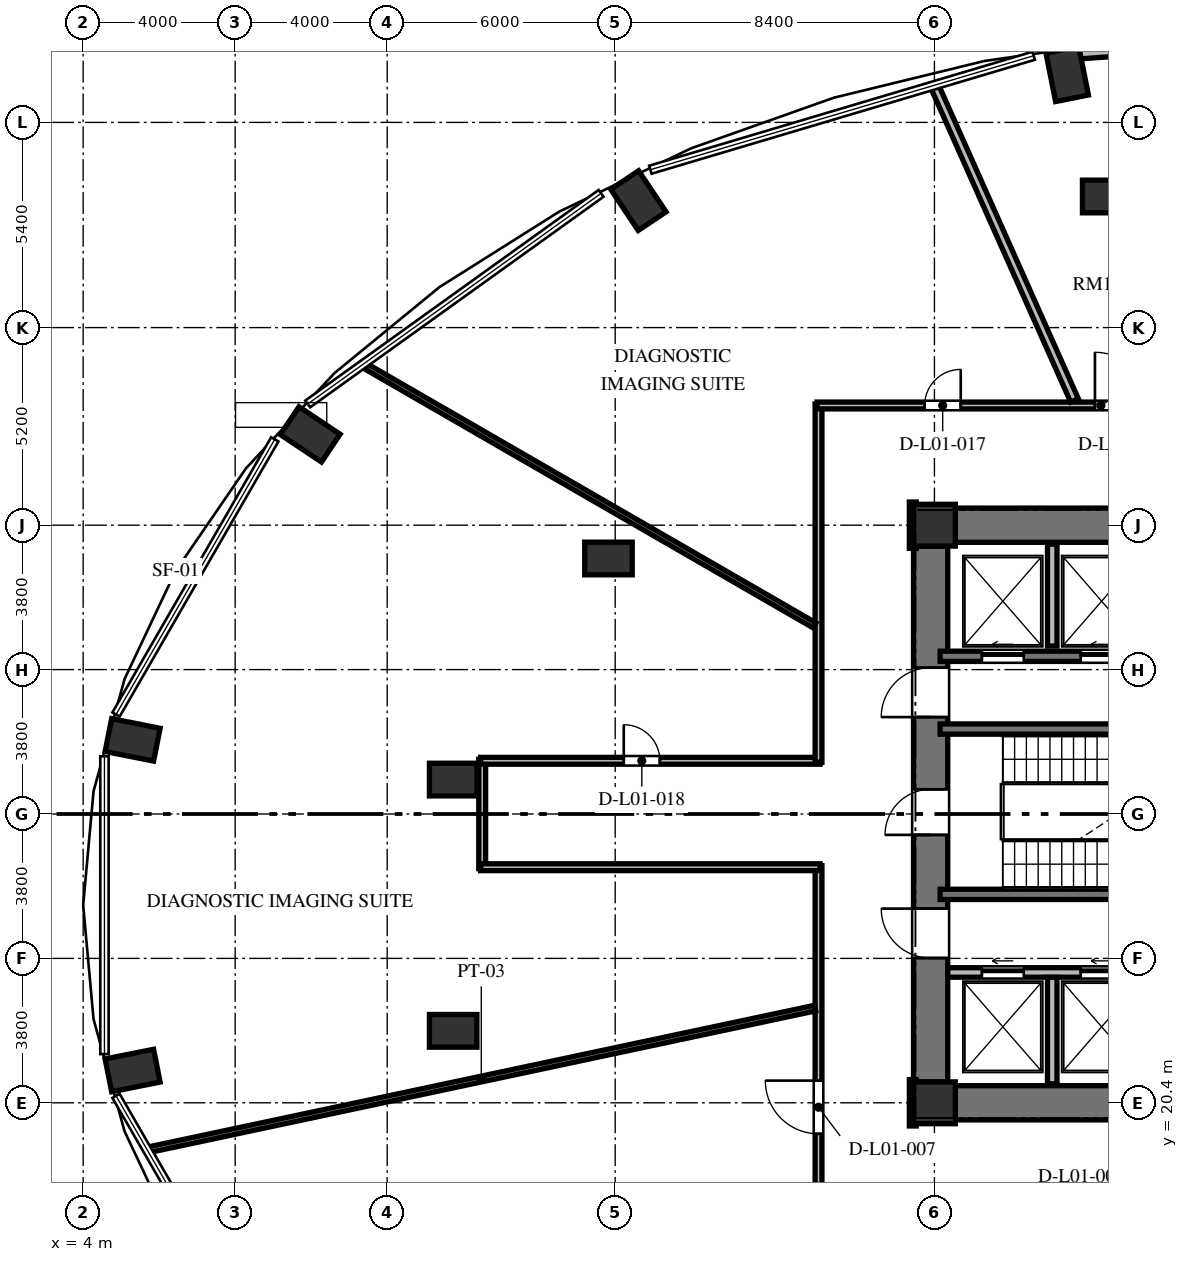
"""IFC4 building model, lengths in metres.
Left out: names, types, materials, properties, quantities, classifications, styles, units other than length and angle.
Written with IfcOpenShell. Run it as: python <this file> out.ifc"""

import sys

from ifc_helpers import new_model, si_unit, direction, frame, frame_2d, origin, origin_2d, place, context, subcontext, project, spatial, rectangle, extrude, element, fill, save


model = new_model("IFC4")
c1 = context("Model", 3, precision=1e-05, world=origin(), true_north=direction((0.0, 1.0)))
c2 = subcontext(c1, "Body", "Model", "MODEL_VIEW")
j1 = project(units=[si_unit("LENGTHUNIT", "METRE"), si_unit("PLANEANGLEUNIT", "RADIAN")], contexts=[c1])
p1 = place(None, origin())
s1 = spatial("IfcSite", under=j1, at=p1, CompositionType="ELEMENT")
p2 = place(p1, origin())
s2 = spatial("IfcBuilding", under=s1, at=p2, CompositionType="ELEMENT")
p3 = place(p2, frame((0.0, 0.0, 6.0)))
s3 = spatial("IfcBuildingStorey", under=s2, at=p3, CompositionType="ELEMENT", Elevation=6.0)
for number, where, z_axis, x_axis in (
    (1, (29.894, 47.471, 0.0), (0.0, 0.0, 1.0), (-0.195, 0.981, 0.0)),
    (2, (18.611, 44.142, 0.0), (0.0, 0.0, 1.0), (-0.556, 0.831, 0.0)),
    (3, (9.975, 37.989, 0.0), (0.0, 0.0, 1.0), (-0.831, 0.556, 0.0)),
    (4, (5.302, 29.95, 0.0), (0.0, 0.0, 1.0), (-0.981, 0.195, 0.0)),
    (5, (5.302, 21.25, 0.0), (0.0, 0.0, 1.0), (-0.981, -0.195, 0.0)),
):
    element("IfcColumn", number, at=place(p3, frame(where, z_axis=z_axis, x_axis=x_axis)), inside=s3, PredefinedType="COLUMN", context=c2, shape_type="SweptSolid", body=[
        extrude(rectangle(XDim=1.3, YDim=0.88, at=origin_2d()), origin(), (0.0, 0.0, 1.0), 4.8),
    ])
for number, where, z_axis, x_axis in (
    (6, (26.4, 20.4, 0.0), (0.0, 0.0, 1.0), (1.0, 0.0, 0.0)),
    (7, (26.4, 35.6, 0.0), (0.0, 0.0, 1.0), (1.0, 0.0, 0.0)),
):
    element("IfcColumn", number, at=place(p3, frame(where, z_axis=z_axis, x_axis=x_axis)), inside=s3, PredefinedType="COLUMN", context=c2, shape_type="SweptSolid", body=[
        extrude(rectangle(XDim=1.1, YDim=1.1, at=origin_2d()), origin(), (0.0, 0.0, 1.0), 4.8),
    ])
for number, where, z_axis, x_axis in (
    (8, (30.92, 44.25, 0.0), (0.0, 0.0, 1.0), (1.0, 0.0, 0.0)),
    (9, (17.823, 34.724, 0.0), (0.0, 0.0, 1.0), (1.0, 0.0, 0.0)),
    (10, (13.737, 28.906, 0.0), (0.0, 0.0, 1.0), (1.0, 0.0, 0.0)),
    (11, (13.737, 22.294, 0.0), (0.0, 0.0, 1.0), (1.0, 0.0, 0.0)),
):
    element("IfcColumn", number, at=place(p3, frame(where, z_axis=z_axis, x_axis=x_axis)), inside=s3, PredefinedType="COLUMN", context=c2, shape_type="SweptSolid", body=[
        extrude(rectangle(XDim=1.25, YDim=0.86, at=origin_2d()), origin(), (0.0, 0.0, 1.0), 4.8),
    ])
p4 = place(p3, frame((26.3, 20.95, 0.0), z_axis=(0.0, 0.0, 1.0), x_axis=(0.0, 1.0, 0.0)))
e12 = element("IfcWall", 12, at=p4, inside=s3, PredefinedType="SHEAR", context=c2, shape_type="SweptSolid", body=[
    extrude(rectangle(XDim=14.1, YDim=0.9, at=frame_2d((7.05, 0.0))), origin(), (0.0, 0.0, 1.0), 4.8),
])
p5 = place(p4, frame((6.5, 0.0, 0.0)))
e13 = element("IfcOpeningElement", 13, at=p5, cuts=e12, PredefinedType="OPENING", context=c2, shape_type="SweptSolid", body=[
    extrude(rectangle(XDim=1.2, YDim=2.15, at=frame_2d((0.6, 1.075))), frame((0.0, 0.46, 0.0), z_axis=(0.0, -1.0, 0.0), x_axis=(1.0, 0.0, 0.0)), (0.0, 0.0, 1.0), 0.92),
])
p6 = place(p4, frame((9.6, 0.0, 0.0)))
e14 = element("IfcOpeningElement", 14, at=p6, cuts=e12, PredefinedType="OPENING", context=c2, shape_type="SweptSolid", body=[
    extrude(rectangle(XDim=1.3, YDim=2.2, at=frame_2d((0.65, 1.1))), frame((0.0, 0.46, 0.0), z_axis=(0.0, -1.0, 0.0), x_axis=(1.0, 0.0, 0.0)), (0.0, 0.0, 1.0), 0.92),
])
p7 = place(p4, frame((3.26, 0.0, 0.0)))
e15 = element("IfcOpeningElement", 15, at=p7, cuts=e12, PredefinedType="OPENING", context=c2, shape_type="SweptSolid", body=[
    extrude(rectangle(XDim=1.3, YDim=2.2, at=frame_2d((0.65, 1.1))), frame((0.0, 0.46, 0.0), z_axis=(0.0, -1.0, 0.0), x_axis=(1.0, 0.0, 0.0)), (0.0, 0.0, 1.0), 0.92),
])
for number, where, z_axis, x_axis in (
    (16, (26.95, 20.4, 0.0), (0.0, 0.0, 1.0), (1.0, 0.0, 0.0)),
    (17, (26.95, 35.6, 0.0), (0.0, 0.0, 1.0), (1.0, 0.0, 0.0)),
):
    element("IfcWall", number, at=place(p3, frame(where, z_axis=z_axis, x_axis=x_axis)), inside=s3, PredefinedType="SHEAR", context=c2, shape_type="SweptSolid", body=[
        extrude(rectangle(XDim=5.3, YDim=0.9, at=frame_2d((2.65, 0.0))), origin(), (0.0, 0.0, 1.0), 4.8),
    ])
p8 = place(p3, frame((36.179, 48.453, 0.0), z_axis=(0.0, 0.0, 1.0), x_axis=(-0.997513108184, -0.070481196075, 0.0)))
e18 = element("IfcWall", 18, at=p8, inside=s3, PredefinedType="SOLIDWALL", context=c2, shape_type="SweptSolid", body=[
    extrude(rectangle(XDim=6.457, YDim=0.32, at=frame_2d((3.229, 0.0))), origin(), (0.0, 0.0, 1.0), 4.52),
])
p9 = place(p8, frame((1.548, 0.0, 0.85)))
e19 = element("IfcOpeningElement", 19, at=p9, cuts=e18, PredefinedType="OPENING", context=c2, shape_type="SweptSolid", body=[
    extrude(rectangle(XDim=1.8, YDim=2.4, at=frame_2d((0.9, 1.2))), frame((0.0, 0.17, 0.0), z_axis=(0.0, -1.0, 0.0), x_axis=(1.0, 0.0, 0.0)), (0.0, 0.0, 1.0), 0.34),
])
for number, where, z_axis, x_axis in (
    (20, (26.55, 30.235, 0.0), (0.0, 0.0, 1.0), (1.0, 0.0, 0.0)),
    (21, (26.55, 25.885, 0.0), (0.0, 0.0, 1.0), (1.0, 0.0, 0.0)),
):
    element("IfcWall", number, at=place(p3, frame(where, z_axis=z_axis, x_axis=x_axis)), inside=s3, PredefinedType="SHEAR", context=c2, shape_type="SweptSolid", body=[
        extrude(rectangle(XDim=7.985, YDim=0.27, at=frame_2d((3.992, 0.0))), origin(), (0.0, 0.0, 1.0), 4.8),
    ])
p10 = place(p3, frame((26.55, 32.15, 0.0), z_axis=(0.0, 0.0, 1.0), x_axis=(1.0, 0.0, 0.0)))
e22 = element("IfcWall", 22, at=p10, inside=s3, PredefinedType="SHEAR", context=c2, shape_type="SweptSolid", body=[
    extrude(rectangle(XDim=16.4, YDim=0.27, at=frame_2d((8.2, 0.0))), origin(), (0.0, 0.0, 1.0), 4.8),
])
p11 = place(p10, frame((1.1, 0.0, 0.0)))
e23 = element("IfcOpeningElement", 23, at=p11, cuts=e22, PredefinedType="OPENING", context=c2, shape_type="SweptSolid", body=[
    extrude(rectangle(XDim=1.1, YDim=2.2, at=frame_2d((0.55, 1.1))), frame((0.0, 0.145, 0.0), z_axis=(0.0, -1.0, 0.0), x_axis=(1.0, 0.0, 0.0)), (0.0, 0.0, 1.0), 0.29),
])
p12 = place(p10, frame((3.7, 0.0, 0.0)))
e24 = element("IfcOpeningElement", 24, at=p12, cuts=e22, PredefinedType="OPENING", context=c2, shape_type="SweptSolid", body=[
    extrude(rectangle(XDim=1.1, YDim=2.2, at=frame_2d((0.55, 1.1))), frame((0.0, 0.145, 0.0), z_axis=(0.0, -1.0, 0.0), x_axis=(1.0, 0.0, 0.0)), (0.0, 0.0, 1.0), 0.29),
])
p13 = place(p10, frame((6.5, 0.0, 0.0)))
e25 = element("IfcOpeningElement", 25, at=p13, cuts=e22, PredefinedType="OPENING", context=c2, shape_type="SweptSolid", body=[
    extrude(rectangle(XDim=1.1, YDim=2.2, at=frame_2d((0.55, 1.1))), frame((0.0, 0.145, 0.0), z_axis=(0.0, -1.0, 0.0), x_axis=(1.0, 0.0, 0.0)), (0.0, 0.0, 1.0), 0.29),
])
p14 = place(p10, frame((9.1, 0.0, 0.0)))
e26 = element("IfcOpeningElement", 26, at=p14, cuts=e22, PredefinedType="OPENING", context=c2, shape_type="SweptSolid", body=[
    extrude(rectangle(XDim=1.1, YDim=2.2, at=frame_2d((0.55, 1.1))), frame((0.0, 0.145, 0.0), z_axis=(0.0, -1.0, 0.0), x_axis=(1.0, 0.0, 0.0)), (0.0, 0.0, 1.0), 0.29),
])
p15 = place(p10, frame((11.9, 0.0, 0.0)))
e27 = element("IfcOpeningElement", 27, at=p15, cuts=e22, PredefinedType="OPENING", context=c2, shape_type="SweptSolid", body=[
    extrude(rectangle(XDim=1.1, YDim=2.2, at=frame_2d((0.55, 1.1))), frame((0.0, 0.145, 0.0), z_axis=(0.0, -1.0, 0.0), x_axis=(1.0, 0.0, 0.0)), (0.0, 0.0, 1.0), 0.29),
])
p16 = place(p10, frame((14.5, 0.0, 0.0)))
e28 = element("IfcOpeningElement", 28, at=p16, cuts=e22, PredefinedType="OPENING", context=c2, shape_type="SweptSolid", body=[
    extrude(rectangle(XDim=1.1, YDim=2.2, at=frame_2d((0.55, 1.1))), frame((0.0, 0.145, 0.0), z_axis=(0.0, -1.0, 0.0), x_axis=(1.0, 0.0, 0.0)), (0.0, 0.0, 1.0), 0.29),
])
p17 = place(p3, frame((26.75, 23.83, 0.0), z_axis=(0.0, 0.0, 1.0), x_axis=(1.0, 0.0, 0.0)))
e29 = element("IfcWall", 29, at=p17, inside=s3, PredefinedType="SOLIDWALL", context=c2, shape_type="SweptSolid", body=[
    extrude(rectangle(XDim=16.2, YDim=0.25, at=frame_2d((8.1, 0.0))), origin(), (0.0, 0.0, 1.0), 4.52),
])
p18 = place(p17, frame((0.9, 0.0, 0.0)))
e30 = element("IfcOpeningElement", 30, at=p18, cuts=e29, PredefinedType="OPENING", context=c2, shape_type="SweptSolid", body=[
    extrude(rectangle(XDim=1.1, YDim=2.2, at=frame_2d((0.55, 1.1))), frame((0.0, 0.135, 0.0), z_axis=(0.0, -1.0, 0.0), x_axis=(1.0, 0.0, 0.0)), (0.0, 0.0, 1.0), 0.27),
])
p19 = place(p17, frame((3.5, 0.0, 0.0)))
e31 = element("IfcOpeningElement", 31, at=p19, cuts=e29, PredefinedType="OPENING", context=c2, shape_type="SweptSolid", body=[
    extrude(rectangle(XDim=1.1, YDim=2.2, at=frame_2d((0.55, 1.1))), frame((0.0, 0.135, 0.0), z_axis=(0.0, -1.0, 0.0), x_axis=(1.0, 0.0, 0.0)), (0.0, 0.0, 1.0), 0.27),
])
p20 = place(p17, frame((6.3, 0.0, 0.0)))
e32 = element("IfcOpeningElement", 32, at=p20, cuts=e29, PredefinedType="OPENING", context=c2, shape_type="SweptSolid", body=[
    extrude(rectangle(XDim=1.1, YDim=2.2, at=frame_2d((0.55, 1.1))), frame((0.0, 0.135, 0.0), z_axis=(0.0, -1.0, 0.0), x_axis=(1.0, 0.0, 0.0)), (0.0, 0.0, 1.0), 0.27),
])
p21 = place(p17, frame((8.9, 0.0, 0.0)))
e33 = element("IfcOpeningElement", 33, at=p21, cuts=e29, PredefinedType="OPENING", context=c2, shape_type="SweptSolid", body=[
    extrude(rectangle(XDim=1.1, YDim=2.2, at=frame_2d((0.55, 1.1))), frame((0.0, 0.135, 0.0), z_axis=(0.0, -1.0, 0.0), x_axis=(1.0, 0.0, 0.0)), (0.0, 0.0, 1.0), 0.27),
])
p22 = place(p17, frame((11.7, 0.0, 0.0)))
e34 = element("IfcOpeningElement", 34, at=p22, cuts=e29, PredefinedType="OPENING", context=c2, shape_type="SweptSolid", body=[
    extrude(rectangle(XDim=1.1, YDim=2.2, at=frame_2d((0.55, 1.1))), frame((0.0, 0.135, 0.0), z_axis=(0.0, -1.0, 0.0), x_axis=(1.0, 0.0, 0.0)), (0.0, 0.0, 1.0), 0.27),
])
p23 = place(p17, frame((14.15, 0.0, 0.0)))
e35 = element("IfcOpeningElement", 35, at=p23, cuts=e29, PredefinedType="OPENING", context=c2, shape_type="SweptSolid", body=[
    extrude(rectangle(XDim=1.4, YDim=2.3, at=frame_2d((0.7, 1.15))), frame((0.0, 0.135, 0.0), z_axis=(0.0, -1.0, 0.0), x_axis=(1.0, 0.0, 0.0)), (0.0, 0.0, 1.0), 0.27),
])
p24 = place(p3, frame((29.5, 32.42, 0.0), z_axis=(0.0, 0.0, 1.0), x_axis=(0.0, 1.0, 0.0)))
e36 = element("IfcWall", 36, at=p24, inside=s3, PredefinedType="SOLIDWALL", context=c2, shape_type="SweptSolid", body=[
    extrude(rectangle(XDim=2.68, YDim=0.25, at=frame_2d((1.34, 0.0))), origin(), (0.0, 0.0, 1.0), 4.52),
])
p25 = place(p3, frame((29.5, 20.9, 0.0), z_axis=(0.0, 0.0, 1.0), x_axis=(0.0, 1.0, 0.0)))
e37 = element("IfcWall", 37, at=p25, inside=s3, PredefinedType="SOLIDWALL", context=c2, shape_type="SweptSolid", body=[
    extrude(rectangle(XDim=2.8, YDim=0.25, at=frame_2d((1.4, 0.0))), origin(), (0.0, 0.0, 1.0), 4.52),
])
p26 = place(p3, frame((14.5, 26.56, 0.0), z_axis=(0.0, 0.0, 1.0), x_axis=(0.0, 1.0, 0.0)))
e38 = element("IfcWall", 38, at=p26, inside=s3, PredefinedType="PARTITIONING", context=c2, shape_type="SweptSolid", body=[
    extrude(rectangle(XDim=2.88, YDim=0.18, at=frame_2d((1.44, 0.0))), origin(), (0.0, 0.0, 1.0), 4.52),
])
p27 = place(p3, frame((14.46, 29.4, 0.0), z_axis=(0.0, 0.0, 1.0), x_axis=(1.0, 0.0, 0.0)))
e39 = element("IfcWall", 39, at=p27, inside=s3, PredefinedType="PARTITIONING", context=c2, shape_type="SweptSolid", body=[
    extrude(rectangle(XDim=8.93, YDim=0.18, at=frame_2d((4.465, 0.0))), origin(), (0.0, 0.0, 1.0), 4.52),
])
p28 = place(p27, frame((3.765, 0.0, 0.0)))
e40 = element("IfcOpeningElement", 40, at=p28, cuts=e39, PredefinedType="OPENING", context=c2, shape_type="SweptSolid", body=[
    extrude(rectangle(XDim=0.95, YDim=2.1, at=frame_2d((0.475, 1.05))), frame((0.0, 0.1, 0.0), z_axis=(0.0, -1.0, 0.0), x_axis=(1.0, 0.0, 0.0)), (0.0, 0.0, 1.0), 0.2),
])
p29 = place(p3, frame((23.35, 29.36, 0.0), z_axis=(0.0, 0.0, 1.0), x_axis=(0.0, 1.0, 0.0)))
e41 = element("IfcWall", 41, at=p29, inside=s3, PredefinedType="PARTITIONING", context=c2, shape_type="SweptSolid", body=[
    extrude(rectangle(XDim=9.43, YDim=0.18, at=frame_2d((4.715, 0.0))), origin(), (0.0, 0.0, 1.0), 4.52),
])
p30 = place(p3, frame((23.31, 38.75, 0.0), z_axis=(0.0, 0.0, 1.0), x_axis=(1.0, 0.0, 0.0)))
e42 = element("IfcWall", 42, at=p30, inside=s3, PredefinedType="PARTITIONING", context=c2, shape_type="SweptSolid", body=[
    extrude(rectangle(XDim=29.88, YDim=0.18, at=frame_2d((14.94, 0.0))), origin(), (0.0, 0.0, 1.0), 4.52),
])
p31 = place(p30, frame((25.211, 0.0, 0.0)))
e43 = element("IfcOpeningElement", 43, at=p31, cuts=e42, PredefinedType="OPENING", context=c2, shape_type="SweptSolid", body=[
    extrude(rectangle(XDim=1.4, YDim=2.2, at=frame_2d((0.7, 1.1))), frame((0.0, 0.1, 0.0), z_axis=(0.0, -1.0, 0.0), x_axis=(1.0, 0.0, 0.0)), (0.0, 0.0, 1.0), 0.2),
])
p32 = place(p30, frame((18.158, 0.0, 0.0)))
e44 = element("IfcOpeningElement", 44, at=p32, cuts=e42, PredefinedType="OPENING", context=c2, shape_type="SweptSolid", body=[
    extrude(rectangle(XDim=1.05, YDim=2.15, at=frame_2d((0.525, 1.075))), frame((0.0, 0.1, 0.0), z_axis=(0.0, -1.0, 0.0), x_axis=(1.0, 0.0, 0.0)), (0.0, 0.0, 1.0), 0.2),
])
p33 = place(p30, frame((11.785, 0.0, 0.0)))
e45 = element("IfcOpeningElement", 45, at=p33, cuts=e42, PredefinedType="OPENING", context=c2, shape_type="SweptSolid", body=[
    extrude(rectangle(XDim=1.05, YDim=2.15, at=frame_2d((0.525, 1.075))), frame((0.0, 0.1, 0.0), z_axis=(0.0, -1.0, 0.0), x_axis=(1.0, 0.0, 0.0)), (0.0, 0.0, 1.0), 0.2),
])
p34 = place(p30, frame((7.314, 0.0, 0.0)))
e46 = element("IfcOpeningElement", 46, at=p34, cuts=e42, PredefinedType="OPENING", context=c2, shape_type="SweptSolid", body=[
    extrude(rectangle(XDim=1.4, YDim=2.2, at=frame_2d((0.7, 1.1))), frame((0.0, 0.1, 0.0), z_axis=(0.0, -1.0, 0.0), x_axis=(1.0, 0.0, 0.0)), (0.0, 0.0, 1.0), 0.2),
])
p35 = place(p30, frame((2.832, 0.0, 0.0)))
e47 = element("IfcOpeningElement", 47, at=p35, cuts=e42, PredefinedType="OPENING", context=c2, shape_type="SweptSolid", body=[
    extrude(rectangle(XDim=0.95, YDim=2.1, at=frame_2d((0.475, 1.05))), frame((0.0, 0.1, 0.0), z_axis=(0.0, -1.0, 0.0), x_axis=(1.0, 0.0, 0.0)), (0.0, 0.0, 1.0), 0.2),
])
for number, where, z_axis, x_axis in (
    (48, (25.83, 36.21, 0.0), (0.0, 0.0, 1.0), (0.0, -1.0, 0.0)),
    (49, (25.83, 21.01, 0.0), (0.0, 0.0, 1.0), (0.0, -1.0, 0.0)),
):
    element("IfcWall", number, at=place(p3, frame(where, z_axis=z_axis, x_axis=x_axis)), inside=s3, PredefinedType="PARTITIONING", context=c2, shape_type="SweptSolid", body=[
        extrude(rectangle(XDim=1.22, YDim=0.18, at=frame_2d((0.61, 0.0))), origin(), (0.0, 0.0, 1.0), 4.52),
    ])
p36 = place(p3, frame((23.35, 17.36, 0.0), z_axis=(0.0, 0.0, 1.0), x_axis=(0.0, 1.0, 0.0)))
e50 = element("IfcWall", 50, at=p36, inside=s3, PredefinedType="PARTITIONING", context=c2, shape_type="SweptSolid", body=[
    extrude(rectangle(XDim=9.28, YDim=0.18, at=frame_2d((4.64, 0.0))), origin(), (0.0, 0.0, 1.0), 4.52),
])
p37 = place(p36, frame((2.224, 0.0, 0.0)))
e51 = element("IfcOpeningElement", 51, at=p37, cuts=e50, PredefinedType="OPENING", context=c2, shape_type="SweptSolid", body=[
    extrude(rectangle(XDim=1.4, YDim=2.2, at=frame_2d((0.7, 1.1))), frame((0.0, 0.1, 0.0), z_axis=(0.0, -1.0, 0.0), x_axis=(1.0, 0.0, 0.0)), (0.0, 0.0, 1.0), 0.2),
])
p38 = place(p3, frame((23.39, 26.6, 0.0), z_axis=(0.0, 0.0, 1.0), x_axis=(-1.0, 0.0, 0.0)))
e52 = element("IfcWall", 52, at=p38, inside=s3, PredefinedType="PARTITIONING", context=c2, shape_type="SweptSolid", body=[
    extrude(rectangle(XDim=8.93, YDim=0.18, at=frame_2d((4.465, 0.0))), origin(), (0.0, 0.0, 1.0), 4.52),
])
p39 = place(p3, frame((30.086, 38.883, 0.0), z_axis=(0.0, 0.0, 1.0), x_axis=(-0.406742961245, 0.913542644586, 0.0)))
e53 = element("IfcWall", 53, at=p39, inside=s3, PredefinedType="PARTITIONING", context=c2, shape_type="SweptSolid", body=[
    extrude(rectangle(XDim=9.067, YDim=0.22, at=frame_2d((4.534, 0.0))), origin(), (0.0, 0.0, 1.0), 4.52),
])
p40 = place(p3, frame((23.243, 32.965, 0.0), z_axis=(0.0, 0.0, 1.0), x_axis=(-0.866019355129, 0.500010476433, 0.0)))
e54 = element("IfcWall", 54, at=p40, inside=s3, PredefinedType="PARTITIONING", context=c2, shape_type="SweptSolid", body=[
    extrude(rectangle(XDim=13.721, YDim=0.15, at=frame_2d((6.86, 0.0))), origin(), (0.0, 0.0, 1.0), 4.52),
])
p41 = place(p3, frame((23.261, 22.892, 0.0), z_axis=(0.0, 0.0, 1.0), x_axis=(-0.978149523722, -0.207902643662, 0.0)))
e55 = element("IfcWall", 55, at=p41, inside=s3, PredefinedType="PARTITIONING", context=c2, shape_type="SweptSolid", body=[
    extrude(rectangle(XDim=17.963, YDim=0.15, at=frame_2d((8.982, 0.0))), origin(), (0.0, 0.0, 1.0), 4.52),
])
p42 = place(p5, origin())
e56 = element("IfcDoor", 56, at=p42, inside=s3, OperationType="SINGLE_SWING_LEFT", PredefinedType="DOOR", context=c2, shape_type="SweptSolid", body=[
    extrude(rectangle(XDim=1.2, YDim=2.15, at=frame_2d((0.6, 1.075))), frame((0.0, 0.025, 0.0), z_axis=(0.0, -1.0, 0.0), x_axis=(1.0, 0.0, 0.0)), (0.0, 0.0, 1.0), 0.05),
])
fill(e13, e56)
p43 = place(p6, origin())
e57 = element("IfcDoor", 57, at=p43, inside=s3, OperationType="SINGLE_SWING_LEFT", PredefinedType="DOOR", context=c2, shape_type="SweptSolid", body=[
    extrude(rectangle(XDim=1.3, YDim=2.2, at=frame_2d((0.65, 1.1))), frame((0.0, 0.025, 0.0), z_axis=(0.0, -1.0, 0.0), x_axis=(1.0, 0.0, 0.0)), (0.0, 0.0, 1.0), 0.05),
])
fill(e14, e57)
p44 = place(p7, origin())
e58 = element("IfcDoor", 58, at=p44, inside=s3, OperationType="SINGLE_SWING_RIGHT", PredefinedType="DOOR", context=c2, shape_type="SweptSolid", body=[
    extrude(rectangle(XDim=1.3, YDim=2.2, at=frame_2d((0.65, 1.1))), frame((0.0, 0.025, 0.0), z_axis=(0.0, -1.0, 0.0), x_axis=(1.0, 0.0, 0.0)), (0.0, 0.0, 1.0), 0.05),
])
fill(e15, e58)
p45 = place(p11, origin())
e59 = element("IfcDoor", 59, at=p45, inside=s3, OperationType="SLIDING_TO_LEFT", PredefinedType="DOOR", context=c2, shape_type="SweptSolid", body=[
    extrude(rectangle(XDim=1.1, YDim=2.2, at=frame_2d((0.55, 1.1))), frame((0.0, 0.025, 0.0), z_axis=(0.0, -1.0, 0.0), x_axis=(1.0, 0.0, 0.0)), (0.0, 0.0, 1.0), 0.05),
])
fill(e23, e59)
p46 = place(p12, origin())
e60 = element("IfcDoor", 60, at=p46, inside=s3, OperationType="SLIDING_TO_LEFT", PredefinedType="DOOR", context=c2, shape_type="SweptSolid", body=[
    extrude(rectangle(XDim=1.1, YDim=2.2, at=frame_2d((0.55, 1.1))), frame((0.0, 0.025, 0.0), z_axis=(0.0, -1.0, 0.0), x_axis=(1.0, 0.0, 0.0)), (0.0, 0.0, 1.0), 0.05),
])
fill(e24, e60)
p47 = place(p18, origin())
e61 = element("IfcDoor", 61, at=p47, inside=s3, OperationType="SLIDING_TO_LEFT", PredefinedType="DOOR", context=c2, shape_type="SweptSolid", body=[
    extrude(rectangle(XDim=1.1, YDim=2.2, at=frame_2d((0.55, 1.1))), frame((0.0, 0.025, 0.0), z_axis=(0.0, -1.0, 0.0), x_axis=(1.0, 0.0, 0.0)), (0.0, 0.0, 1.0), 0.05),
])
fill(e30, e61)
p48 = place(p19, origin())
e62 = element("IfcDoor", 62, at=p48, inside=s3, OperationType="SLIDING_TO_LEFT", PredefinedType="DOOR", context=c2, shape_type="SweptSolid", body=[
    extrude(rectangle(XDim=1.1, YDim=2.2, at=frame_2d((0.55, 1.1))), frame((0.0, 0.025, 0.0), z_axis=(0.0, -1.0, 0.0), x_axis=(1.0, 0.0, 0.0)), (0.0, 0.0, 1.0), 0.05),
])
fill(e31, e62)
p49 = place(p37, origin())
e63 = element("IfcDoor", 63, at=p49, inside=s3, OperationType="SINGLE_SWING_RIGHT", PredefinedType="DOOR", context=c2, shape_type="SweptSolid", body=[
    extrude(rectangle(XDim=1.4, YDim=2.2, at=frame_2d((0.7, 1.1))), frame((0.0, 0.025, 0.0), z_axis=(0.0, -1.0, 0.0), x_axis=(1.0, 0.0, 0.0)), (0.0, 0.0, 1.0), 0.05),
])
fill(e51, e63)
p50 = place(p34, origin())
e64 = element("IfcDoor", 64, at=p50, inside=s3, OperationType="SINGLE_SWING_LEFT", PredefinedType="DOOR", context=c2, shape_type="SweptSolid", body=[
    extrude(rectangle(XDim=1.4, YDim=2.2, at=frame_2d((0.7, 1.1))), frame((0.0, 0.025, 0.0), z_axis=(0.0, -1.0, 0.0), x_axis=(1.0, 0.0, 0.0)), (0.0, 0.0, 1.0), 0.05),
])
fill(e46, e64)
p51 = place(p35, origin())
e65 = element("IfcDoor", 65, at=p51, inside=s3, OperationType="SINGLE_SWING_RIGHT", PredefinedType="DOOR", context=c2, shape_type="SweptSolid", body=[
    extrude(rectangle(XDim=0.95, YDim=2.1, at=frame_2d((0.475, 1.05))), frame((0.0, 0.025, 0.0), z_axis=(0.0, -1.0, 0.0), x_axis=(1.0, 0.0, 0.0)), (0.0, 0.0, 1.0), 0.05),
])
fill(e47, e65)
p52 = place(p28, origin())
e66 = element("IfcDoor", 66, at=p52, inside=s3, OperationType="SINGLE_SWING_LEFT", PredefinedType="DOOR", context=c2, shape_type="SweptSolid", body=[
    extrude(rectangle(XDim=0.95, YDim=2.1, at=frame_2d((0.475, 1.05))), frame((0.0, 0.025, 0.0), z_axis=(0.0, -1.0, 0.0), x_axis=(1.0, 0.0, 0.0)), (0.0, 0.0, 1.0), 0.05),
])
fill(e40, e66)
save(model, sys.argv[1])
